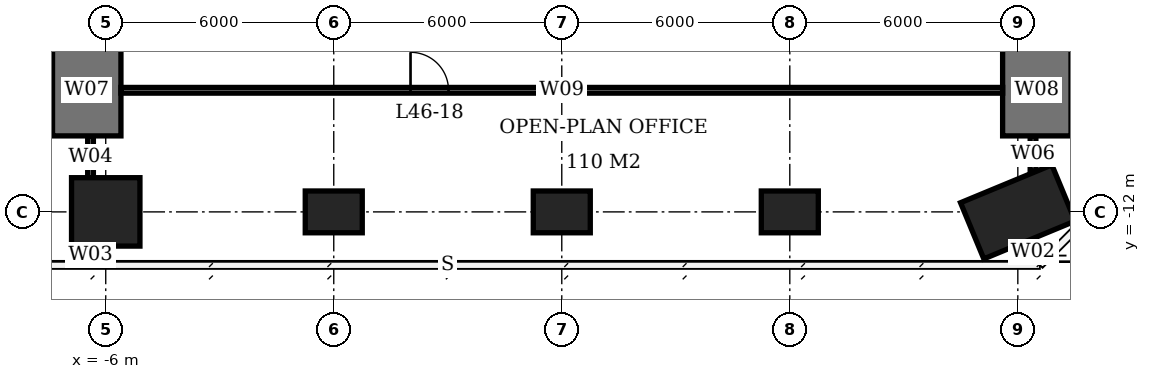
"""IFC4 building model, lengths in metres.
Left out: names, types, materials, properties, quantities, classifications, styles, units other than length and angle.
Written with IfcOpenShell. Run it as: python <this file> out.ifc"""

import sys

from ifc_helpers import new_model, si_unit, direction, frame, frame_2d, origin, origin_2d, place, context, subcontext, project, spatial, rectangle, extrude, element, fill, save


model = new_model("IFC4")
c1 = context("Model", 3, precision=1e-05, world=origin(), true_north=direction((0.0, 1.0)))
c2 = subcontext(c1, "Body", "Model", "MODEL_VIEW")
j1 = project(units=[si_unit("LENGTHUNIT", "METRE"), si_unit("PLANEANGLEUNIT", "RADIAN")], contexts=[c1])
p1 = place(None, origin())
s1 = spatial("IfcSite", under=j1, at=p1, CompositionType="ELEMENT")
p2 = place(p1, origin())
s2 = spatial("IfcBuilding", under=s1, at=p2, CompositionType="ELEMENT")
p3 = place(p2, frame((0.0, 0.0, 188.9)))
s3 = spatial("IfcBuildingStorey", under=s2, at=p3, CompositionType="ELEMENT", Elevation=188.9)
p4 = place(p3, frame((-6.0, -12.0, 0.0), z_axis=(0.0, 0.0, 1.0), x_axis=(1.0, 0.0, 0.0)))
e1 = element("IfcColumn", 1, at=p4, inside=s3, PredefinedType="COLUMN", context=c2, shape_type="SweptSolid", body=[
    extrude(rectangle(XDim=1.8, YDim=1.8, at=origin_2d()), origin(), (0.0, 0.0, 1.0), 3.9),
])
for number, where, z_axis, x_axis in (
    (2, (0.0, -12.0, 0.0), (0.0, 0.0, 1.0), (1.0, 0.0, 0.0)),
    (3, (6.0, -12.0, 0.0), (0.0, 0.0, 1.0), (1.0, 0.0, 0.0)),
    (4, (12.0, -12.0, 0.0), (0.0, 0.0, 1.0), (1.0, 0.0, 0.0)),
):
    element("IfcColumn", number, at=place(p3, frame(where, z_axis=z_axis, x_axis=x_axis)), inside=s3, PredefinedType="COLUMN", context=c2, shape_type="SweptSolid", body=[
        extrude(rectangle(XDim=1.5, YDim=1.1, at=origin_2d()), origin(), (0.0, 0.0, 1.0), 3.9),
    ])
p5 = place(p3, frame((18.0, -12.0, 0.0), z_axis=(0.0, 0.0, 1.0), x_axis=(-0.923879532511, -0.382683432365, 0.0)))
e5 = element("IfcColumn", 5, at=p5, inside=s3, PredefinedType="COLUMN", context=c2, shape_type="SweptSolid", body=[
    extrude(rectangle(XDim=2.6, YDim=1.6, at=origin_2d()), origin(), (0.0, 0.0, 1.0), 3.9),
])
for number, where, z_axis, x_axis in (
    (6, (-6.5, -10.0, 0.0), (0.0, 0.0, 1.0), (0.0, 1.0, 0.0)),
    (7, (18.5, -10.0, 0.0), (0.0, 0.0, 1.0), (0.0, 1.0, 0.0)),
):
    element("IfcWall", number, at=place(p3, frame(where, z_axis=z_axis, x_axis=x_axis)), inside=s3, PredefinedType="SHEAR", context=c2, shape_type="SweptSolid", body=[
        extrude(rectangle(XDim=2.4, YDim=1.8, at=frame_2d((1.2, 0.0))), origin(), (0.0, 0.0, 1.0), 3.9),
    ])
p6 = place(p3, frame((-6.4, -13.35, 0.0), z_axis=(0.0, 0.0, 1.0), x_axis=(0.0, 1.0, 0.0)))
e8 = element("IfcWall", 8, at=p6, inside=s3, PredefinedType="PARTITIONING", context=c2, shape_type="SweptSolid", body=[
    extrude(rectangle(XDim=0.45, YDim=0.15, at=frame_2d((0.225, 0.0))), origin(), (0.0, 0.0, 1.0), 3.65),
])
p7 = place(p3, frame((-6.4, -11.1, 0.0), z_axis=(0.0, 0.0, 1.0), x_axis=(0.0, 1.0, 0.0)))
e9 = element("IfcWall", 9, at=p7, inside=s3, PredefinedType="PARTITIONING", context=c2, shape_type="SweptSolid", body=[
    extrude(rectangle(XDim=1.1, YDim=0.15, at=frame_2d((0.55, 0.0))), origin(), (0.0, 0.0, 1.0), 3.65),
])
p8 = place(p3, frame((-5.6, -8.8, 0.0), z_axis=(0.0, 0.0, 1.0), x_axis=(1.0, 0.0, 0.0)))
e10 = element("IfcWall", 10, at=p8, inside=s3, PredefinedType="PARTITIONING", context=c2, shape_type="SweptSolid", body=[
    extrude(rectangle(XDim=23.2, YDim=0.15, at=frame_2d((11.6, 0.0))), origin(), (0.0, 0.0, 1.0), 3.65),
])
p9 = place(p8, frame((7.62, 0.0, 0.0)))
e11 = element("IfcOpeningElement", 11, at=p9, cuts=e10, PredefinedType="OPENING", context=c2, shape_type="SweptSolid", body=[
    extrude(rectangle(XDim=1.0, YDim=2.1, at=frame_2d((0.5, 1.05))), frame((0.0, 0.085, 0.0), z_axis=(0.0, -1.0, 0.0), x_axis=(1.0, 0.0, 0.0)), (0.0, 0.0, 1.0), 0.17),
])
p10 = place(p3, frame((18.4, -13.4, 0.0), z_axis=(0.0, 0.0, 1.0), x_axis=(0.0, 1.0, 0.0)))
e12 = element("IfcWall", 12, at=p10, inside=s3, PredefinedType="PARTITIONING", context=c2, shape_type="SweptSolid", body=[
    extrude(rectangle(XDim=0.669, YDim=0.15, at=frame_2d((0.334, 0.0))), origin(), (0.0, 0.0, 1.0), 3.65),
])
p11 = place(p3, frame((18.4, -10.937, 0.0), z_axis=(0.0, 0.0, 1.0), x_axis=(0.0, 1.0, 0.0)))
e13 = element("IfcWall", 13, at=p11, inside=s3, PredefinedType="PARTITIONING", context=c2, shape_type="SweptSolid", body=[
    extrude(rectangle(XDim=0.937, YDim=0.15, at=frame_2d((0.469, 0.0))), origin(), (0.0, 0.0, 1.0), 3.65),
])
p12 = place(p9, origin())
e14 = element("IfcDoor", 14, at=p12, inside=s3, OperationType="SINGLE_SWING_LEFT", PredefinedType="DOOR", context=c2, shape_type="SweptSolid", body=[
    extrude(rectangle(XDim=1.0, YDim=2.1, at=frame_2d((0.5, 1.05))), frame((0.0, 0.025, 0.0), z_axis=(0.0, -1.0, 0.0), x_axis=(1.0, 0.0, 0.0)), (0.0, 0.0, 1.0), 0.05),
])
fill(e11, e14)
save(model, sys.argv[1])
